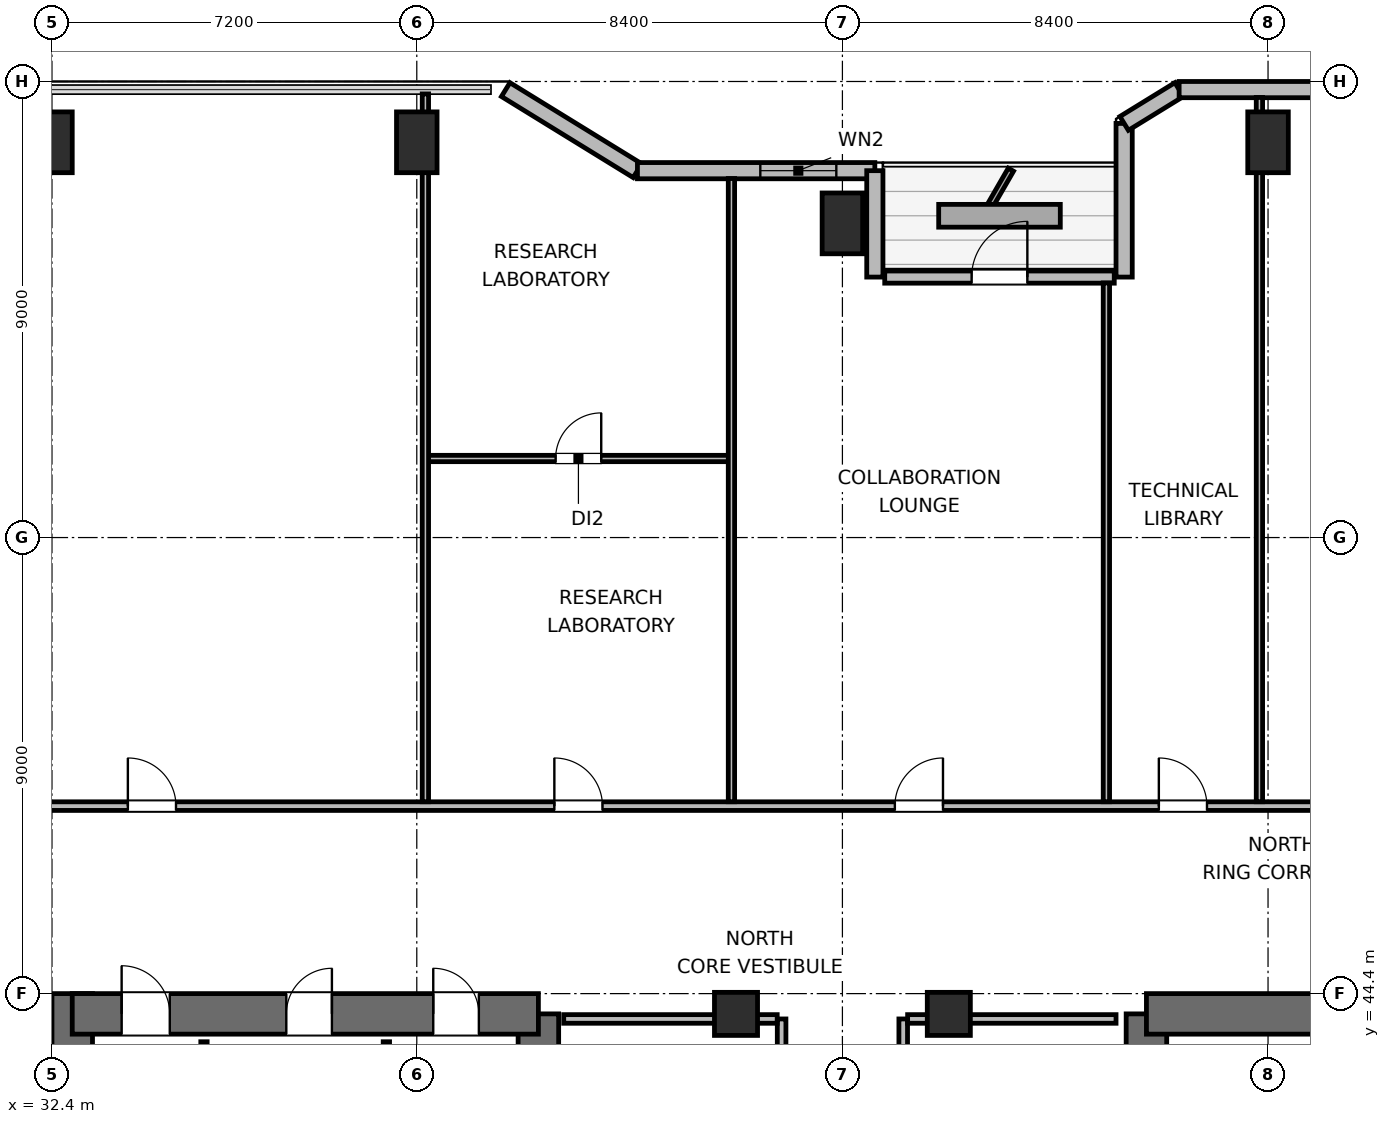
"""IFC4 building model, lengths in metres.
Left out: names, types, materials, properties, quantities, classifications, styles, units other than length and angle.
Written with IfcOpenShell. Run it as: python <this file> out.ifc"""

import sys

from ifc_helpers import new_model, si_unit, direction, frame, frame_2d, origin, origin_2d, place, context, subcontext, project, spatial, rectangle, extrude, element, fill, save


model = new_model("IFC4")
c1 = context("Model", 3, precision=1e-05, world=origin(), true_north=direction((0.0, 1.0)))
c2 = subcontext(c1, "Body", "Model", "MODEL_VIEW")
j1 = project(units=[si_unit("LENGTHUNIT", "METRE"), si_unit("PLANEANGLEUNIT", "RADIAN")], contexts=[c1])
p1 = place(None, origin())
s1 = spatial("IfcSite", under=j1, at=p1, CompositionType="ELEMENT")
p2 = place(p1, origin())
s2 = spatial("IfcBuilding", under=s1, at=p2, CompositionType="ELEMENT")
p3 = place(p2, frame((0.0, 0.0, 101.4)))
s3 = spatial("IfcBuildingStorey", under=s2, at=p3, CompositionType="ELEMENT", Elevation=101.4)
p4 = place(p3, frame((32.8, 27.6, 0.0), z_axis=(0.0, 0.0, 1.0), x_axis=(0.0, 1.0, 0.0)))
e1 = element("IfcWall", 1, at=p4, inside=s3, PredefinedType="SHEAR", context=c2, shape_type="SweptSolid", body=[
    extrude(rectangle(XDim=16.8, YDim=0.8, at=frame_2d((8.4, 0.0))), origin(), (0.0, 0.0, 1.0), 3.9),
])
p5 = place(p3, frame((42.0, 37.8, 0.0), z_axis=(0.0, 0.0, 1.0), x_axis=(0.0, 1.0, 0.0)))
e2 = element("IfcWall", 2, at=p5, inside=s3, PredefinedType="SHEAR", context=c2, shape_type="SweptSolid", body=[
    extrude(rectangle(XDim=6.2, YDim=0.8, at=frame_2d((3.1, 0.0))), origin(), (0.0, 0.0, 1.0), 3.9),
])
p6 = place(p3, frame((32.8, 44.0, 0.0), z_axis=(0.0, 0.0, 1.0), x_axis=(1.0, 0.0, 0.0)))
e3 = element("IfcWall", 3, at=p6, inside=s3, PredefinedType="SHEAR", context=c2, shape_type="SweptSolid", body=[
    extrude(rectangle(XDim=9.2, YDim=0.8, at=frame_2d((4.6, 0.0))), origin(), (0.0, 0.0, 1.0), 3.9),
])
p7 = place(p6, frame((0.975, 0.0, 0.0)))
e4 = element("IfcOpeningElement", 4, at=p7, cuts=e3, PredefinedType="OPENING", context=c2, shape_type="SweptSolid", body=[
    extrude(rectangle(XDim=0.95, YDim=2.04, at=frame_2d((0.475, 1.02))), frame((0.0, 0.41, 0.0), z_axis=(0.0, -1.0, 0.0), x_axis=(1.0, 0.0, 0.0)), (0.0, 0.0, 1.0), 0.82),
])
p8 = place(p6, frame((4.225, 0.0, 0.0)))
e5 = element("IfcOpeningElement", 5, at=p8, cuts=e3, PredefinedType="OPENING", context=c2, shape_type="SweptSolid", body=[
    extrude(rectangle(XDim=0.9, YDim=2.02, at=frame_2d((0.45, 1.01))), frame((0.0, 0.41, 0.0), z_axis=(0.0, -1.0, 0.0), x_axis=(1.0, 0.0, 0.0)), (0.0, 0.0, 1.0), 0.82),
])
p9 = place(p6, frame((7.125, 0.0, 0.0)))
e6 = element("IfcOpeningElement", 6, at=p9, cuts=e3, PredefinedType="OPENING", context=c2, shape_type="SweptSolid", body=[
    extrude(rectangle(XDim=0.9, YDim=2.02, at=frame_2d((0.45, 1.01))), frame((0.0, 0.41, 0.0), z_axis=(0.0, -1.0, 0.0), x_axis=(1.0, 0.0, 0.0)), (0.0, 0.0, 1.0), 0.82),
])
p10 = place(p3, frame((54.0, 38.0, 0.0), z_axis=(0.0, 0.0, 1.0), x_axis=(0.0, 1.0, 0.0)))
e7 = element("IfcWall", 7, at=p10, inside=s3, PredefinedType="SHEAR", context=c2, shape_type="SweptSolid", body=[
    extrude(rectangle(XDim=6.0, YDim=0.8, at=frame_2d((3.0, 0.0))), origin(), (0.0, 0.0, 1.0), 3.9),
])
p11 = place(p3, frame((54.0, 44.0, 0.0), z_axis=(0.0, 0.0, 1.0), x_axis=(1.0, 0.0, 0.0)))
e8 = element("IfcWall", 8, at=p11, inside=s3, PredefinedType="SHEAR", context=c2, shape_type="SweptSolid", body=[
    extrude(rectangle(XDim=9.2, YDim=0.8, at=frame_2d((4.6, 0.0))), origin(), (0.0, 0.0, 1.0), 3.9),
])
for number, where, z_axis, x_axis in (
    (9, (32.4, 61.2, 0.0), (0.0, 0.0, 1.0), (1.0, 0.0, 0.0)),
    (10, (39.6, 61.2, 0.0), (0.0, 0.0, 1.0), (1.0, 0.0, 0.0)),
    (11, (48.0, 59.6, 0.0), (0.0, 0.0, 1.0), (1.0, 0.0, 0.0)),
    (12, (56.4, 61.2, 0.0), (0.0, 0.0, 1.0), (1.0, 0.0, 0.0)),
):
    element("IfcColumn", number, at=place(p3, frame(where, z_axis=z_axis, x_axis=x_axis)), inside=s3, PredefinedType="COLUMN", context=c2, shape_type="SweptSolid", body=[
        extrude(rectangle(XDim=0.8, YDim=1.2, at=origin_2d()), origin(), (0.0, 0.0, 1.0), 3.9),
    ])
for number, where, z_axis, x_axis in (
    (13, (45.9, 44.0, 0.0), (0.0, 0.0, 1.0), (1.0, 0.0, 0.0)),
    (14, (50.1, 44.0, 0.0), (0.0, 0.0, 1.0), (1.0, 0.0, 0.0)),
):
    element("IfcColumn", number, at=place(p3, frame(where, z_axis=z_axis, x_axis=x_axis)), inside=s3, PredefinedType="COLUMN", context=c2, shape_type="SweptSolid", body=[
        extrude(rectangle(XDim=0.85, YDim=0.85, at=origin_2d()), origin(), (0.0, 0.0, 1.0), 3.9),
    ])
p12 = place(p3, frame((41.355, 62.24, 0.0), z_axis=(0.0, 0.0, 1.0), x_axis=(0.851630857047, -0.524142044989, 0.0)))
e15 = element("IfcWall", 15, at=p12, inside=s3, PredefinedType="SOLIDWALL", context=c2, shape_type="SweptSolid", body=[
    extrude(rectangle(XDim=3.053, YDim=0.32, at=frame_2d((1.526, 0.0))), origin(), (0.0, 0.0, 1.0), 2.875),
])
p13 = place(p3, frame((43.955, 60.64, 0.0), z_axis=(0.0, 0.0, 1.0), x_axis=(1.0, 0.0, 0.0)))
e16 = element("IfcWall", 16, at=p13, inside=s3, PredefinedType="SOLIDWALL", context=c2, shape_type="SweptSolid", body=[
    extrude(rectangle(XDim=4.685, YDim=0.32, at=frame_2d((2.343, 0.0))), origin(), (0.0, 0.0, 1.0), 2.875),
])
p14 = place(p13, frame((2.425, 0.0, 0.85)))
e17 = element("IfcOpeningElement", 17, at=p14, cuts=e16, PredefinedType="OPENING", context=c2, shape_type="SweptSolid", body=[
    extrude(rectangle(XDim=1.5, YDim=1.1, at=frame_2d((0.75, 0.55))), frame((0.0, 0.17, 0.0), z_axis=(0.0, -1.0, 0.0), x_axis=(1.0, 0.0, 0.0)), (0.0, 0.0, 1.0), 0.34),
])
p15 = place(p3, frame((48.64, 60.64, 0.0), z_axis=(0.0, 0.0, 1.0), x_axis=(0.0, -1.0, 0.0)))
e18 = element("IfcWall", 18, at=p15, inside=s3, PredefinedType="SOLIDWALL", context=c2, shape_type="SweptSolid", body=[
    extrude(rectangle(XDim=2.1, YDim=0.32, at=frame_2d((1.05, 0.0))), origin(), (0.0, 0.0, 1.0), 2.875),
])
p16 = place(p3, frame((48.835, 58.54, 0.0), z_axis=(0.0, 0.0, 1.0), x_axis=(1.0, 0.0, 0.0)))
e19 = element("IfcWall", 19, at=p16, inside=s3, PredefinedType="SOLIDWALL", context=c2, shape_type="SweptSolid", body=[
    extrude(rectangle(XDim=4.53, YDim=0.24, at=frame_2d((2.265, 0.0))), origin(), (0.0, 0.0, 1.0), 3.64),
])
p17 = place(p16, frame((1.715, 0.0, 0.0)))
e20 = element("IfcOpeningElement", 20, at=p17, cuts=e19, PredefinedType="OPENING", context=c2, shape_type="SweptSolid", body=[
    extrude(rectangle(XDim=1.1, YDim=2.04, at=frame_2d((0.55, 1.02))), frame((0.0, 0.13, 0.0), z_axis=(0.0, -1.0, 0.0), x_axis=(1.0, 0.0, 0.0)), (0.0, 0.0, 1.0), 0.26),
])
p18 = place(p3, frame((53.56, 58.54, 0.0), z_axis=(0.0, 0.0, 1.0), x_axis=(0.0, 1.0, 0.0)))
e21 = element("IfcWall", 21, at=p18, inside=s3, PredefinedType="SOLIDWALL", context=c2, shape_type="SweptSolid", body=[
    extrude(rectangle(XDim=3.032, YDim=0.32, at=frame_2d((1.516, 0.0))), origin(), (0.0, 0.0, 1.0), 2.875),
])
p19 = place(p3, frame((53.56, 61.573, 0.0), z_axis=(0.0, 0.0, 1.0), x_axis=(0.851776724646, 0.523904964045, 0.0)))
e22 = element("IfcWall", 22, at=p19, inside=s3, PredefinedType="SOLIDWALL", context=c2, shape_type="SweptSolid", body=[
    extrude(rectangle(XDim=1.274, YDim=0.32, at=frame_2d((0.637, 0.0))), origin(), (0.0, 0.0, 1.0), 3.64),
])
p20 = place(p3, frame((54.645, 62.24, 0.0), z_axis=(0.0, 0.0, 1.0), x_axis=(1.0, 0.0, 0.0)))
e23 = element("IfcWall", 23, at=p20, inside=s3, PredefinedType="SOLIDWALL", context=c2, shape_type="SweptSolid", body=[
    extrude(rectangle(XDim=10.734, YDim=0.32, at=frame_2d((5.367, 0.0))), origin(), (0.0, 0.0, 1.0), 3.64),
])
for number, where, z_axis, x_axis in (
    (24, (35.4, 41.095, 0.0), (0.0, 0.0, 1.0), (0.0, 1.0, 0.0)),
    (25, (39.0, 41.095, 0.0), (0.0, 0.0, 1.0), (0.0, 1.0, 0.0)),
):
    element("IfcWall", number, at=place(p3, frame(where, z_axis=z_axis, x_axis=x_axis)), inside=s3, PredefinedType="PARTITIONING", context=c2, shape_type="SweptSolid", body=[
        extrude(rectangle(XDim=2.355, YDim=0.125, at=frame_2d((1.177, 0.0))), origin(), (0.0, 0.0, 1.0), 3.64),
    ])
p21 = place(p3, frame((46.8, 37.9, 0.0), z_axis=(0.0, 0.0, 1.0), x_axis=(0.0, 1.0, 0.0)))
e26 = element("IfcWall", 26, at=p21, inside=s3, PredefinedType="PARTITIONING", context=c2, shape_type="SweptSolid", body=[
    extrude(rectangle(XDim=6.0, YDim=0.17, at=frame_2d((3.0, 0.0))), origin(), (0.0, 0.0, 1.0), 3.64),
])
p22 = place(p21, frame((0.54, 0.0, 0.0)))
e27 = element("IfcOpeningElement", 27, at=p22, cuts=e26, PredefinedType="OPENING", context=c2, shape_type="SweptSolid", body=[
    extrude(rectangle(XDim=0.9, YDim=2.02, at=frame_2d((0.45, 1.01))), frame((0.0, 0.095, 0.0), z_axis=(0.0, -1.0, 0.0), x_axis=(1.0, 0.0, 0.0)), (0.0, 0.0, 1.0), 0.19),
])
p23 = place(p21, frame((2.55, 0.0, 0.0)))
e28 = element("IfcOpeningElement", 28, at=p23, cuts=e26, PredefinedType="OPENING", context=c2, shape_type="SweptSolid", body=[
    extrude(rectangle(XDim=0.9, YDim=2.02, at=frame_2d((0.45, 1.01))), frame((0.0, 0.095, 0.0), z_axis=(0.0, -1.0, 0.0), x_axis=(1.0, 0.0, 0.0)), (0.0, 0.0, 1.0), 0.19),
])
p24 = place(p21, frame((4.56, 0.0, 0.0)))
e29 = element("IfcOpeningElement", 29, at=p24, cuts=e26, PredefinedType="OPENING", context=c2, shape_type="SweptSolid", body=[
    extrude(rectangle(XDim=0.9, YDim=2.02, at=frame_2d((0.45, 1.01))), frame((0.0, 0.095, 0.0), z_axis=(0.0, -1.0, 0.0), x_axis=(1.0, 0.0, 0.0)), (0.0, 0.0, 1.0), 0.19),
])
p25 = place(p3, frame((42.5, 43.9, 0.0), z_axis=(0.0, 0.0, 1.0), x_axis=(1.0, 0.0, 0.0)))
e30 = element("IfcWall", 30, at=p25, inside=s3, PredefinedType="PARTITIONING", context=c2, shape_type="SweptSolid", body=[
    extrude(rectangle(XDim=4.213, YDim=0.17, at=frame_2d((2.106, 0.0))), origin(), (0.0, 0.0, 1.0), 2.525),
])
p26 = place(p3, frame((49.2, 37.9, 0.0), z_axis=(0.0, 0.0, 1.0), x_axis=(0.0, 1.0, 0.0)))
e31 = element("IfcWall", 31, at=p26, inside=s3, PredefinedType="PARTITIONING", context=c2, shape_type="SweptSolid", body=[
    extrude(rectangle(XDim=6.0, YDim=0.17, at=frame_2d((3.0, 0.0))), origin(), (0.0, 0.0, 1.0), 3.64),
])
p27 = place(p26, frame((0.69, 0.0, 0.0)))
e32 = element("IfcOpeningElement", 32, at=p27, cuts=e31, PredefinedType="OPENING", context=c2, shape_type="SweptSolid", body=[
    extrude(rectangle(XDim=0.9, YDim=2.02, at=frame_2d((0.45, 1.01))), frame((0.0, 0.095, 0.0), z_axis=(0.0, -1.0, 0.0), x_axis=(1.0, 0.0, 0.0)), (0.0, 0.0, 1.0), 0.19),
])
p28 = place(p26, frame((3.69, 0.0, 0.0)))
e33 = element("IfcOpeningElement", 33, at=p28, cuts=e31, PredefinedType="OPENING", context=c2, shape_type="SweptSolid", body=[
    extrude(rectangle(XDim=0.9, YDim=2.02, at=frame_2d((0.45, 1.01))), frame((0.0, 0.095, 0.0), z_axis=(0.0, -1.0, 0.0), x_axis=(1.0, 0.0, 0.0)), (0.0, 0.0, 1.0), 0.19),
])
p29 = place(p3, frame((49.287, 43.9, 0.0), z_axis=(0.0, 0.0, 1.0), x_axis=(1.0, 0.0, 0.0)))
e34 = element("IfcWall", 34, at=p29, inside=s3, PredefinedType="PARTITIONING", context=c2, shape_type="SweptSolid", body=[
    extrude(rectangle(XDim=4.113, YDim=0.17, at=frame_2d((2.056, 0.0))), origin(), (0.0, 0.0, 1.0), 2.525),
])
p30 = place(p3, frame((28.975, 48.1, 0.0), z_axis=(0.0, 0.0, 1.0), x_axis=(1.0, 0.0, 0.0)))
e35 = element("IfcWall", 35, at=p30, inside=s3, PredefinedType="PARTITIONING", context=c2, shape_type="SweptSolid", body=[
    extrude(rectangle(XDim=38.05, YDim=0.17, at=frame_2d((19.025, 0.0))), origin(), (0.0, 0.0, 1.0), 3.64),
])
p31 = place(p30, frame((4.923, 0.0, 0.0)))
e36 = element("IfcOpeningElement", 36, at=p31, cuts=e35, PredefinedType="OPENING", context=c2, shape_type="SweptSolid", body=[
    extrude(rectangle(XDim=0.95, YDim=2.04, at=frame_2d((0.475, 1.02))), frame((0.0, 0.095, 0.0), z_axis=(0.0, -1.0, 0.0), x_axis=(1.0, 0.0, 0.0)), (0.0, 0.0, 1.0), 0.19),
])
p32 = place(p30, frame((13.34, 0.0, 0.0)))
e37 = element("IfcOpeningElement", 37, at=p32, cuts=e35, PredefinedType="OPENING", context=c2, shape_type="SweptSolid", body=[
    extrude(rectangle(XDim=0.95, YDim=2.04, at=frame_2d((0.475, 1.02))), frame((0.0, 0.095, 0.0), z_axis=(0.0, -1.0, 0.0), x_axis=(1.0, 0.0, 0.0)), (0.0, 0.0, 1.0), 0.19),
])
p33 = place(p30, frame((20.06, 0.0, 0.0)))
e38 = element("IfcOpeningElement", 38, at=p33, cuts=e35, PredefinedType="OPENING", context=c2, shape_type="SweptSolid", body=[
    extrude(rectangle(XDim=0.95, YDim=2.04, at=frame_2d((0.475, 1.02))), frame((0.0, 0.095, 0.0), z_axis=(0.0, -1.0, 0.0), x_axis=(1.0, 0.0, 0.0)), (0.0, 0.0, 1.0), 0.19),
])
p34 = place(p30, frame((25.27, 0.0, 0.0)))
e39 = element("IfcOpeningElement", 39, at=p34, cuts=e35, PredefinedType="OPENING", context=c2, shape_type="SweptSolid", body=[
    extrude(rectangle(XDim=0.95, YDim=2.04, at=frame_2d((0.475, 1.02))), frame((0.0, 0.095, 0.0), z_axis=(0.0, -1.0, 0.0), x_axis=(1.0, 0.0, 0.0)), (0.0, 0.0, 1.0), 0.19),
])
p35 = place(p30, frame((32.178, 0.0, 0.0)))
e40 = element("IfcOpeningElement", 40, at=p35, cuts=e35, PredefinedType="OPENING", context=c2, shape_type="SweptSolid", body=[
    extrude(rectangle(XDim=0.95, YDim=2.04, at=frame_2d((0.475, 1.02))), frame((0.0, 0.095, 0.0), z_axis=(0.0, -1.0, 0.0), x_axis=(1.0, 0.0, 0.0)), (0.0, 0.0, 1.0), 0.19),
])
p36 = place(p3, frame((39.77, 54.96, 0.0), z_axis=(0.0, 0.0, 1.0), x_axis=(1.0, 0.0, 0.0)))
e41 = element("IfcWall", 41, at=p36, inside=s3, PredefinedType="PARTITIONING", context=c2, shape_type="SweptSolid", body=[
    extrude(rectangle(XDim=6.04, YDim=0.125, at=frame_2d((3.02, 0.0))), origin(), (0.0, 0.0, 1.0), 3.64),
])
p37 = place(p36, frame((2.57, 0.0, 0.0)))
e42 = element("IfcOpeningElement", 42, at=p37, cuts=e41, PredefinedType="OPENING", context=c2, shape_type="SweptSolid", body=[
    extrude(rectangle(XDim=0.9, YDim=2.02, at=frame_2d((0.45, 1.01))), frame((0.0, 0.073, 0.0), z_axis=(0.0, -1.0, 0.0), x_axis=(1.0, 0.0, 0.0)), (0.0, 0.0, 1.0), 0.145),
])
p38 = place(p3, frame((39.77, 48.187, 0.0), z_axis=(0.0, 0.0, 1.0), x_axis=(0.0, 1.0, 0.0)))
e43 = element("IfcWall", 43, at=p38, inside=s3, PredefinedType="PARTITIONING", context=c2, shape_type="SweptSolid", body=[
    extrude(rectangle(XDim=13.968, YDim=0.125, at=frame_2d((6.984, 0.0))), origin(), (0.0, 0.0, 1.0), 3.003),
])
p39 = place(p3, frame((45.81, 48.187, 0.0), z_axis=(0.0, 0.0, 1.0), x_axis=(0.0, 1.0, 0.0)))
e44 = element("IfcWall", 44, at=p39, inside=s3, PredefinedType="PARTITIONING", context=c2, shape_type="SweptSolid", body=[
    extrude(rectangle(XDim=12.298, YDim=0.125, at=frame_2d((6.149, 0.0))), origin(), (0.0, 0.0, 1.0), 3.64),
])
p40 = place(p3, frame((53.21, 48.187, 0.0), z_axis=(0.0, 0.0, 1.0), x_axis=(0.0, 1.0, 0.0)))
e45 = element("IfcWall", 45, at=p40, inside=s3, PredefinedType="PARTITIONING", context=c2, shape_type="SweptSolid", body=[
    extrude(rectangle(XDim=10.238, YDim=0.125, at=frame_2d((5.119, 0.0))), origin(), (0.0, 0.0, 1.0), 3.003),
])
p41 = place(p3, frame((56.23, 48.187, 0.0), z_axis=(0.0, 0.0, 1.0), x_axis=(0.0, 1.0, 0.0)))
e46 = element("IfcWall", 46, at=p41, inside=s3, PredefinedType="PARTITIONING", context=c2, shape_type="SweptSolid", body=[
    extrude(rectangle(XDim=13.898, YDim=0.125, at=frame_2d((6.949, 0.0))), origin(), (0.0, 0.0, 1.0), 3.003),
])
p42 = place(p14, origin())
e47 = element("IfcWindow", 47, at=p42, inside=s3, PartitioningType="SINGLE_PANEL", PredefinedType="WINDOW", context=c2, shape_type="SweptSolid", body=[
    extrude(rectangle(XDim=1.5, YDim=1.1, at=frame_2d((0.75, 0.55))), frame((0.0, 0.03, 0.0), z_axis=(0.0, -1.0, 0.0), x_axis=(1.0, 0.0, 0.0)), (0.0, 0.0, 1.0), 0.06),
])
fill(e17, e47)
p43 = place(p17, origin())
e48 = element("IfcDoor", 48, at=p43, inside=s3, OperationType="SINGLE_SWING_RIGHT", PredefinedType="DOOR", context=c2, shape_type="SweptSolid", body=[
    extrude(rectangle(XDim=1.1, YDim=2.04, at=frame_2d((0.55, 1.02))), frame((0.0, 0.025, 0.0), z_axis=(0.0, -1.0, 0.0), x_axis=(1.0, 0.0, 0.0)), (0.0, 0.0, 1.0), 0.05),
])
fill(e20, e48)
p44 = place(p7, origin())
e49 = element("IfcDoor", 49, at=p44, inside=s3, OperationType="SINGLE_SWING_LEFT", PredefinedType="DOOR", context=c2, shape_type="SweptSolid", body=[
    extrude(rectangle(XDim=0.95, YDim=2.04, at=frame_2d((0.475, 1.02))), frame((0.0, 0.025, 0.0), z_axis=(0.0, -1.0, 0.0), x_axis=(1.0, 0.0, 0.0)), (0.0, 0.0, 1.0), 0.05),
])
fill(e4, e49)
p45 = place(p8, origin())
e50 = element("IfcDoor", 50, at=p45, inside=s3, OperationType="SINGLE_SWING_RIGHT", PredefinedType="DOOR", context=c2, shape_type="SweptSolid", body=[
    extrude(rectangle(XDim=0.9, YDim=2.02, at=frame_2d((0.45, 1.01))), frame((0.0, 0.025, 0.0), z_axis=(0.0, -1.0, 0.0), x_axis=(1.0, 0.0, 0.0)), (0.0, 0.0, 1.0), 0.05),
])
fill(e5, e50)
p46 = place(p9, origin())
e51 = element("IfcDoor", 51, at=p46, inside=s3, OperationType="SINGLE_SWING_LEFT", PredefinedType="DOOR", context=c2, shape_type="SweptSolid", body=[
    extrude(rectangle(XDim=0.9, YDim=2.02, at=frame_2d((0.45, 1.01))), frame((0.0, 0.025, 0.0), z_axis=(0.0, -1.0, 0.0), x_axis=(1.0, 0.0, 0.0)), (0.0, 0.0, 1.0), 0.05),
])
fill(e6, e51)
p47 = place(p31, origin())
e52 = element("IfcDoor", 52, at=p47, inside=s3, OperationType="SINGLE_SWING_LEFT", PredefinedType="DOOR", context=c2, shape_type="SweptSolid", body=[
    extrude(rectangle(XDim=0.95, YDim=2.04, at=frame_2d((0.475, 1.02))), frame((0.0, 0.025, 0.0), z_axis=(0.0, -1.0, 0.0), x_axis=(1.0, 0.0, 0.0)), (0.0, 0.0, 1.0), 0.05),
])
fill(e36, e52)
p48 = place(p37, origin())
e53 = element("IfcDoor", 53, at=p48, inside=s3, OperationType="SINGLE_SWING_RIGHT", PredefinedType="DOOR", context=c2, shape_type="SweptSolid", body=[
    extrude(rectangle(XDim=0.9, YDim=2.02, at=frame_2d((0.45, 1.01))), frame((0.0, 0.025, 0.0), z_axis=(0.0, -1.0, 0.0), x_axis=(1.0, 0.0, 0.0)), (0.0, 0.0, 1.0), 0.05),
])
fill(e42, e53)
p49 = place(p32, origin())
e54 = element("IfcDoor", 54, at=p49, inside=s3, OperationType="SINGLE_SWING_LEFT", PredefinedType="DOOR", context=c2, shape_type="SweptSolid", body=[
    extrude(rectangle(XDim=0.95, YDim=2.04, at=frame_2d((0.475, 1.02))), frame((0.0, 0.025, 0.0), z_axis=(0.0, -1.0, 0.0), x_axis=(1.0, 0.0, 0.0)), (0.0, 0.0, 1.0), 0.05),
])
fill(e37, e54)
p50 = place(p33, origin())
e55 = element("IfcDoor", 55, at=p50, inside=s3, OperationType="SINGLE_SWING_RIGHT", PredefinedType="DOOR", context=c2, shape_type="SweptSolid", body=[
    extrude(rectangle(XDim=0.95, YDim=2.04, at=frame_2d((0.475, 1.02))), frame((0.0, 0.025, 0.0), z_axis=(0.0, -1.0, 0.0), x_axis=(1.0, 0.0, 0.0)), (0.0, 0.0, 1.0), 0.05),
])
fill(e38, e55)
p51 = place(p34, origin())
e56 = element("IfcDoor", 56, at=p51, inside=s3, OperationType="SINGLE_SWING_LEFT", PredefinedType="DOOR", context=c2, shape_type="SweptSolid", body=[
    extrude(rectangle(XDim=0.95, YDim=2.04, at=frame_2d((0.475, 1.02))), frame((0.0, 0.025, 0.0), z_axis=(0.0, -1.0, 0.0), x_axis=(1.0, 0.0, 0.0)), (0.0, 0.0, 1.0), 0.05),
])
fill(e39, e56)
save(model, sys.argv[1])
